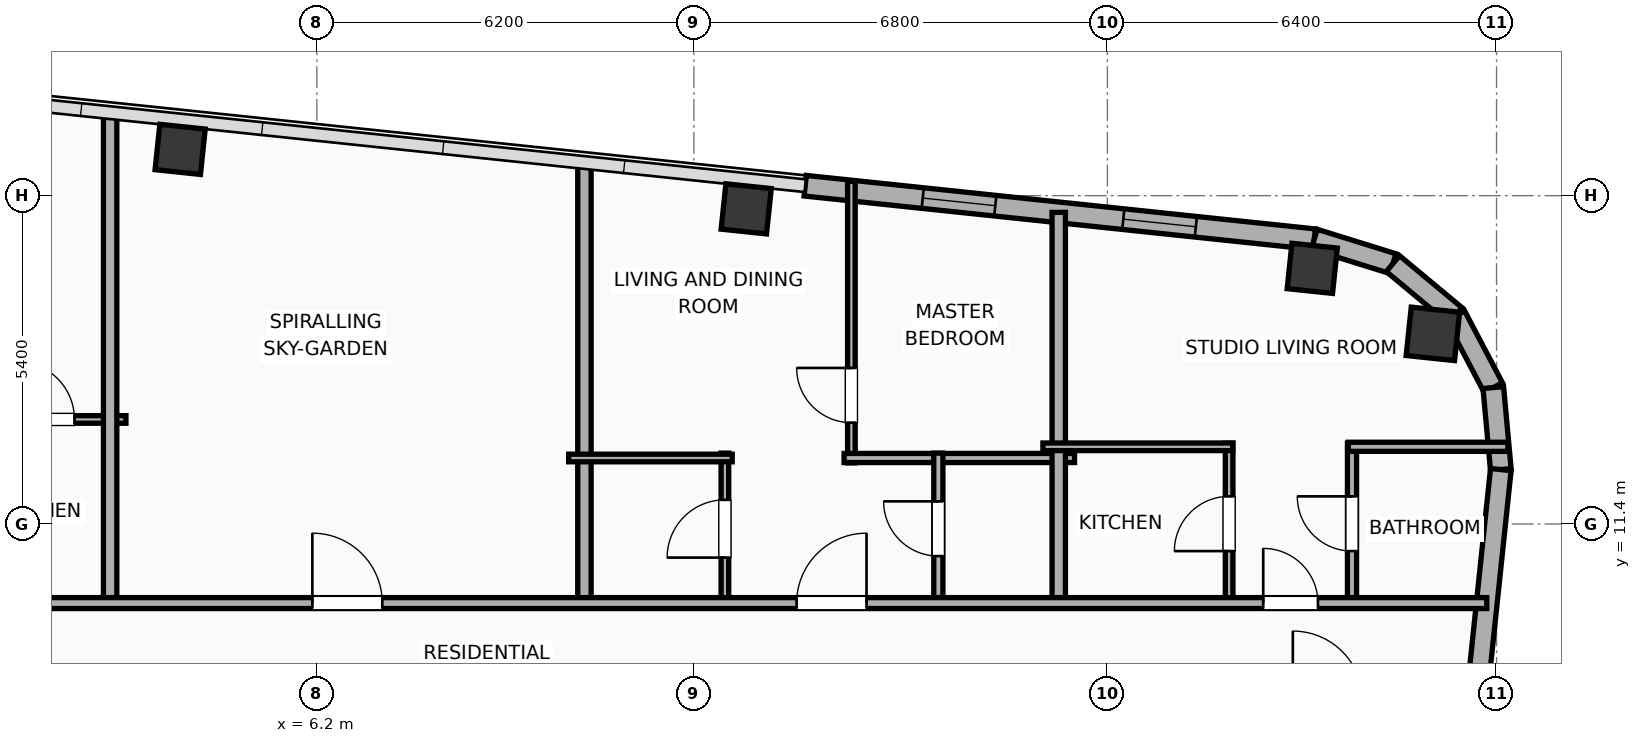
"""IFC4 building model, lengths in metres.
Left out: names, types, materials, properties, quantities, classifications, styles, units other than length and angle.
Written with IfcOpenShell. Run it as: python <this file> out.ifc"""

import sys

from ifc_helpers import new_model, si_unit, direction, frame, frame_2d, origin, origin_2d, place, context, subcontext, project, spatial, rectangle, hollow_rectangle, hollow_circle, extrude, element, fill, save


model = new_model("IFC4")
c1 = context("Model", 3, precision=1e-05, world=origin(), true_north=direction((0.0, 1.0)))
c2 = subcontext(c1, "Body", "Model", "MODEL_VIEW")
j1 = project(units=[si_unit("LENGTHUNIT", "METRE"), si_unit("PLANEANGLEUNIT", "RADIAN")], contexts=[c1])
p1 = place(None, origin())
s1 = spatial("IfcSite", under=j1, at=p1, CompositionType="ELEMENT")
p2 = place(p1, origin())
s2 = spatial("IfcBuilding", under=s1, at=p2, CompositionType="ELEMENT")
p3 = place(p2, frame((0.0, 0.0, 260.0)))
s3 = spatial("IfcBuildingStorey", under=s2, at=p3, CompositionType="ELEMENT", Elevation=260.0)
p4 = place(p3, frame((24.553, 14.527, 0.0), z_axis=(0.0, 0.0, 1.0), x_axis=(0.994521895368, -0.104528463268, 0.0)))
e1 = element("IfcColumn", 1, at=p4, inside=s3, PredefinedType="COLUMN", context=c2, shape_type="SweptSolid", body=[
    extrude(hollow_circle(Radius=0.4, WallThickness=0.028, at=origin_2d()), origin(), (0.0, 0.0, 1.0), 3.9),
])
for number, where, z_axis, x_axis in (
    (2, (22.569, 15.604, 0.0), (0.0, 0.0, 1.0), (0.995, -0.105, 0.0)),
    (3, (13.26, 16.583, 0.0), (0.0, 0.0, 1.0), (0.995, -0.105, 0.0)),
    (4, (3.952, 17.561, 0.0), (0.0, 0.0, 1.0), (0.995, -0.105, 0.0)),
):
    element("IfcColumn", number, at=place(p3, frame(where, z_axis=z_axis, x_axis=x_axis)), inside=s3, PredefinedType="COLUMN", context=c2, shape_type="SweptSolid", body=[
        extrude(hollow_rectangle(XDim=0.75, YDim=0.75, WallThickness=0.025, at=origin_2d()), origin(), (0.0, 0.0, 1.0), 3.9),
    ])
p5 = place(p3, frame((14.231, 16.964, 0.0), z_axis=(0.0, 0.0, 1.0), x_axis=(0.994522285292, -0.104524753323, 0.0)))
e5 = element("IfcWall", 5, at=p5, inside=s3, PredefinedType="ELEMENTEDWALL", context=c2, shape_type="SweptSolid", body=[
    extrude(rectangle(XDim=8.418, YDim=0.34, at=frame_2d((4.209, 0.0))), origin(), (0.0, 0.0, 1.0), 2.54),
])
p6 = place(p5, frame((1.944, 0.0, 0.75)))
e6 = element("IfcOpeningElement", 6, at=p6, cuts=e5, PredefinedType="OPENING", context=c2, shape_type="SweptSolid", body=[
    extrude(rectangle(XDim=1.2, YDim=1.63, at=frame_2d((0.6, 0.815))), frame((0.0, 0.18, 0.0), z_axis=(0.0, -1.0, 0.0), x_axis=(1.0, 0.0, 0.0)), (0.0, 0.0, 1.0), 0.36),
])
p7 = place(p5, frame((5.26, 0.0, 0.75)))
e7 = element("IfcOpeningElement", 7, at=p7, cuts=e5, PredefinedType="OPENING", context=c2, shape_type="SweptSolid", body=[
    extrude(rectangle(XDim=1.2, YDim=1.63, at=frame_2d((0.6, 0.815))), frame((0.0, 0.18, 0.0), z_axis=(0.0, -1.0, 0.0), x_axis=(1.0, 0.0, 0.0)), (0.0, 0.0, 1.0), 0.36),
])
p8 = place(p3, frame((22.603, 16.084, 0.0), z_axis=(0.0, 0.0, 1.0), x_axis=(0.955007802701, -0.296580674994, 0.0)))
e8 = element("IfcWall", 8, at=p8, inside=s3, PredefinedType="ELEMENTEDWALL", context=c2, shape_type="SweptSolid", body=[
    extrude(rectangle(XDim=1.354, YDim=0.34, at=frame_2d((0.677, 0.0))), origin(), (0.0, 0.0, 1.0), 2.54),
])
p9 = place(p3, frame((23.896, 15.682, 0.0), z_axis=(0.0, 0.0, 1.0), x_axis=(0.768789762863, -0.639501603217, 0.0)))
e9 = element("IfcWall", 9, at=p9, inside=s3, PredefinedType="ELEMENTEDWALL", context=c2, shape_type="SweptSolid", body=[
    extrude(rectangle(XDim=1.337, YDim=0.34, at=frame_2d((0.668, 0.0))), origin(), (0.0, 0.0, 1.0), 2.54),
])
p10 = place(p3, frame((24.924, 14.827, 0.0), z_axis=(0.0, 0.0, 1.0), x_axis=(0.46567116636, -0.884957832228, 0.0)))
e10 = element("IfcWall", 10, at=p10, inside=s3, PredefinedType="ELEMENTEDWALL", context=c2, shape_type="SweptSolid", body=[
    extrude(rectangle(XDim=1.337, YDim=0.34, at=frame_2d((0.668, 0.0))), origin(), (0.0, 0.0, 1.0), 3.65),
])
p11 = place(p3, frame((25.546, 13.644, 0.0), z_axis=(0.0, 0.0, 1.0), x_axis=(0.091592370975, -0.995796584438, 0.0)))
e11 = element("IfcWall", 11, at=p11, inside=s3, PredefinedType="ELEMENTEDWALL", context=c2, shape_type="SweptSolid", body=[
    extrude(rectangle(XDim=1.354, YDim=0.34, at=frame_2d((0.677, 0.0))), origin(), (0.0, 0.0, 1.0), 3.65),
])
p12 = place(p3, frame((25.67, 12.296, 0.0), z_axis=(0.0, 0.0, 1.0), x_axis=(-0.104533282919, -0.994521388791, 0.0)))
e12 = element("IfcWall", 12, at=p12, inside=s3, PredefinedType="ELEMENTEDWALL", context=c2, shape_type="SweptSolid", body=[
    extrude(rectangle(XDim=30.366, YDim=0.34, at=frame_2d((15.183, 0.0))), origin(), (0.0, 0.0, 1.0), 2.54),
])
p13 = place(p12, frame((5.842, 0.0, 0.75)))
e13 = element("IfcOpeningElement", 13, at=p13, cuts=e12, PredefinedType="OPENING", context=c2, shape_type="SweptSolid", body=[
    extrude(rectangle(XDim=1.8, YDim=1.63, at=frame_2d((0.9, 0.815))), frame((0.0, 0.18, 0.0), z_axis=(0.0, -1.0, 0.0), x_axis=(1.0, 0.0, 0.0)), (0.0, 0.0, 1.0), 0.36),
])
p14 = place(p12, frame((23.525, 0.0, 0.75)))
e14 = element("IfcOpeningElement", 14, at=p14, cuts=e12, PredefinedType="OPENING", context=c2, shape_type="SweptSolid", body=[
    extrude(rectangle(XDim=1.8, YDim=1.63, at=frame_2d((0.9, 0.815))), frame((0.0, 0.18, 0.0), z_axis=(0.0, -1.0, 0.0), x_axis=(1.0, 0.0, 0.0)), (0.0, 0.0, 1.0), 0.36),
])
p15 = place(p12, frame((27.017, 0.0, 0.75)))
e15 = element("IfcOpeningElement", 15, at=p15, cuts=e12, PredefinedType="OPENING", context=c2, shape_type="SweptSolid", body=[
    extrude(rectangle(XDim=1.2, YDim=1.63, at=frame_2d((0.6, 0.815))), frame((0.0, 0.18, 0.0), z_axis=(0.0, -1.0, 0.0), x_axis=(1.0, 0.0, 0.0)), (0.0, 0.0, 1.0), 0.36),
])
p16 = place(p12, frame((17.829, 0.0, 0.75)))
e16 = element("IfcOpeningElement", 16, at=p16, cuts=e12, PredefinedType="OPENING", context=c2, shape_type="SweptSolid", body=[
    extrude(rectangle(XDim=1.2, YDim=1.63, at=frame_2d((0.6, 0.815))), frame((0.0, 0.18, 0.0), z_axis=(0.0, -1.0, 0.0), x_axis=(1.0, 0.0, 0.0)), (0.0, 0.0, 1.0), 0.36),
])
p17 = place(p3, frame((0.417, 13.12, 0.0), z_axis=(0.0, 0.0, 1.0), x_axis=(1.0, 0.0, 0.0)))
e17 = element("IfcWall", 17, at=p17, inside=s3, PredefinedType="PARTITIONING", context=c2, shape_type="SweptSolid", body=[
    extrude(rectangle(XDim=2.643, YDim=0.125, at=frame_2d((1.322, 0.0))), origin(), (0.0, 0.0, 1.0), 3.65),
])
p18 = place(p17, frame((0.846, 0.0, 0.0)))
e18 = element("IfcOpeningElement", 18, at=p18, cuts=e17, PredefinedType="OPENING", context=c2, shape_type="SweptSolid", body=[
    extrude(rectangle(XDim=0.95, YDim=2.05, at=frame_2d((0.475, 1.025))), frame((0.0, 0.073, 0.0), z_axis=(0.0, -1.0, 0.0), x_axis=(1.0, 0.0, 0.0)), (0.0, 0.0, 1.0), 0.145),
])
p19 = place(p3, frame((2.8, 10.02, 0.0), z_axis=(0.0, 0.0, 1.0), x_axis=(0.0, 1.0, 0.0)))
e19 = element("IfcWall", 19, at=p19, inside=s3, PredefinedType="PARTITIONING", context=c2, shape_type="SweptSolid", body=[
    extrude(rectangle(XDim=8.145, YDim=0.22, at=frame_2d((4.073, 0.0))), origin(), (0.0, 0.0, 1.0), 3.65),
])
p20 = place(p3, frame((10.6, 10.02, 0.0), z_axis=(0.0, 0.0, 1.0), x_axis=(0.0, 1.0, 0.0)))
e20 = element("IfcWall", 20, at=p20, inside=s3, PredefinedType="PARTITIONING", context=c2, shape_type="SweptSolid", body=[
    extrude(rectangle(XDim=7.325, YDim=0.22, at=frame_2d((3.663, 0.0))), origin(), (0.0, 0.0, 1.0), 3.65),
])
p21 = place(p3, frame((14.99, 12.406, 0.0), z_axis=(0.0, 0.0, 1.0), x_axis=(0.0, 1.0, 0.0)))
e21 = element("IfcWall", 21, at=p21, inside=s3, PredefinedType="PARTITIONING", context=c2, shape_type="SweptSolid", body=[
    extrude(rectangle(XDim=4.629, YDim=0.125, at=frame_2d((2.314, 0.0))), origin(), (0.0, 0.0, 1.0), 3.65),
])
p22 = place(p21, frame((0.661, 0.0, 0.0)))
e22 = element("IfcOpeningElement", 22, at=p22, cuts=e21, PredefinedType="OPENING", context=c2, shape_type="SweptSolid", body=[
    extrude(rectangle(XDim=0.9, YDim=2.05, at=frame_2d((0.45, 1.025))), frame((0.0, 0.073, 0.0), z_axis=(0.0, -1.0, 0.0), x_axis=(1.0, 0.0, 0.0)), (0.0, 0.0, 1.0), 0.145),
])
p23 = place(p3, frame((14.87, 12.486, 0.0), z_axis=(0.0, 0.0, 1.0), x_axis=(1.0, 0.0, 0.0)))
e23 = element("IfcWall", 23, at=p23, inside=s3, PredefinedType="PLUMBINGWALL", context=c2, shape_type="SweptSolid", body=[
    extrude(rectangle(XDim=3.79, YDim=0.15, at=frame_2d((1.895, 0.0))), origin(), (0.0, 0.0, 1.0), 3.65),
])
p24 = place(p3, frame((12.91, 10.08, 0.0), z_axis=(0.0, 0.0, 1.0), x_axis=(0.0, 1.0, 0.0)))
e24 = element("IfcWall", 24, at=p24, inside=s3, PredefinedType="PARTITIONING", context=c2, shape_type="SweptSolid", body=[
    extrude(rectangle(XDim=2.486, YDim=0.125, at=frame_2d((1.243, 0.0))), origin(), (0.0, 0.0, 1.0), 2.54),
])
p25 = place(p24, frame((0.768, 0.0, 0.0)))
e25 = element("IfcOpeningElement", 25, at=p25, cuts=e24, PredefinedType="OPENING", context=c2, shape_type="SweptSolid", body=[
    extrude(rectangle(XDim=0.95, YDim=2.05, at=frame_2d((0.475, 1.025))), frame((0.0, 0.073, 0.0), z_axis=(0.0, -1.0, 0.0), x_axis=(1.0, 0.0, 0.0)), (0.0, 0.0, 1.0), 0.145),
])
p26 = place(p3, frame((10.34, 12.486, 0.0), z_axis=(0.0, 0.0, 1.0), x_axis=(1.0, 0.0, 0.0)))
e26 = element("IfcWall", 26, at=p26, inside=s3, PredefinedType="PARTITIONING", context=c2, shape_type="SweptSolid", body=[
    extrude(rectangle(XDim=2.69, YDim=0.125, at=frame_2d((1.345, 0.0))), origin(), (0.0, 0.0, 1.0), 3.65),
])
p27 = place(p3, frame((16.42, 10.08, 0.0), z_axis=(0.0, 0.0, 1.0), x_axis=(0.0, 1.0, 0.0)))
e27 = element("IfcWall", 27, at=p27, inside=s3, PredefinedType="PLUMBINGWALL", context=c2, shape_type="SweptSolid", body=[
    extrude(rectangle(XDim=2.486, YDim=0.15, at=frame_2d((1.243, 0.0))), origin(), (0.0, 0.0, 1.0), 3.65),
])
p28 = place(p27, frame((0.793, 0.0, 0.0)))
e28 = element("IfcOpeningElement", 28, at=p28, cuts=e27, PredefinedType="OPENING", context=c2, shape_type="SweptSolid", body=[
    extrude(rectangle(XDim=0.9, YDim=2.05, at=frame_2d((0.45, 1.025))), frame((0.0, 0.085, 0.0), z_axis=(0.0, -1.0, 0.0), x_axis=(1.0, 0.0, 0.0)), (0.0, 0.0, 1.0), 0.17),
])
p29 = place(p3, frame((18.4, 10.02, 0.0), z_axis=(0.0, 0.0, 1.0), x_axis=(0.0, 1.0, 0.0)))
e29 = element("IfcWall", 29, at=p29, inside=s3, PredefinedType="PARTITIONING", context=c2, shape_type="SweptSolid", body=[
    extrude(rectangle(XDim=6.505, YDim=0.22, at=frame_2d((3.253, 0.0))), origin(), (0.0, 0.0, 1.0), 3.65),
])
p30 = place(p3, frame((21.202, 10.08, 0.0), z_axis=(0.0, 0.0, 1.0), x_axis=(0.0, 1.0, 0.0)))
e30 = element("IfcWall", 30, at=p30, inside=s3, PredefinedType="PARTITIONING", context=c2, shape_type="SweptSolid", body=[
    extrude(rectangle(XDim=2.65, YDim=0.125, at=frame_2d((1.325, 0.0))), origin(), (0.0, 0.0, 1.0), 2.54),
])
p31 = place(p30, frame((0.875, 0.0, 0.0)))
e31 = element("IfcOpeningElement", 31, at=p31, cuts=e30, PredefinedType="OPENING", context=c2, shape_type="SweptSolid", body=[
    extrude(rectangle(XDim=0.9, YDim=2.05, at=frame_2d((0.45, 1.025))), frame((0.0, 0.073, 0.0), z_axis=(0.0, -1.0, 0.0), x_axis=(1.0, 0.0, 0.0)), (0.0, 0.0, 1.0), 0.145),
])
p32 = place(p3, frame((23.223, 10.08, 0.0), z_axis=(0.0, 0.0, 1.0), x_axis=(0.0, 1.0, 0.0)))
e32 = element("IfcWall", 32, at=p32, inside=s3, PredefinedType="PLUMBINGWALL", context=c2, shape_type="SweptSolid", body=[
    extrude(rectangle(XDim=2.65, YDim=0.15, at=frame_2d((1.325, 0.0))), origin(), (0.0, 0.0, 1.0), 3.65),
])
p33 = place(p32, frame((0.875, 0.0, 0.0)))
e33 = element("IfcOpeningElement", 33, at=p33, cuts=e32, PredefinedType="OPENING", context=c2, shape_type="SweptSolid", body=[
    extrude(rectangle(XDim=0.9, YDim=2.05, at=frame_2d((0.45, 1.025))), frame((0.0, 0.085, 0.0), z_axis=(0.0, -1.0, 0.0), x_axis=(1.0, 0.0, 0.0)), (0.0, 0.0, 1.0), 0.17),
])
p34 = place(p3, frame((18.14, 12.67, 0.0), z_axis=(0.0, 0.0, 1.0), x_axis=(1.0, 0.0, 0.0)))
e34 = element("IfcWall", 34, at=p34, inside=s3, PredefinedType="PARTITIONING", context=c2, shape_type="SweptSolid", body=[
    extrude(rectangle(XDim=3.122, YDim=0.125, at=frame_2d((1.561, 0.0))), origin(), (0.0, 0.0, 1.0), 3.65),
])
p35 = place(p3, frame((23.163, 12.67, 0.0), z_axis=(0.0, 0.0, 1.0), x_axis=(1.0, 0.0, 0.0)))
e35 = element("IfcWall", 35, at=p35, inside=s3, PredefinedType="PLUMBINGWALL", context=c2, shape_type="SweptSolid", body=[
    extrude(rectangle(XDim=2.623, YDim=0.15, at=frame_2d((1.312, 0.0))), origin(), (0.0, 0.0, 1.0), 3.65),
])
p36 = place(p3, frame((-28.516, 10.1, 0.0), z_axis=(0.0, 0.0, 1.0), x_axis=(1.0, 0.0, 0.0)))
e36 = element("IfcWall", 36, at=p36, inside=s3, PredefinedType="PARTITIONING", context=c2, shape_type="SweptSolid", body=[
    extrude(rectangle(XDim=53.955, YDim=0.18, at=frame_2d((26.978, 0.0))), origin(), (0.0, 0.0, 1.0), 3.65),
])
p37 = place(p36, frame((3.515, 0.0, 0.0)))
e37 = element("IfcOpeningElement", 37, at=p37, cuts=e36, PredefinedType="OPENING", context=c2, shape_type="SweptSolid", body=[
    extrude(rectangle(XDim=1.15, YDim=2.05, at=frame_2d((0.575, 1.025))), frame((0.0, 0.1, 0.0), z_axis=(0.0, -1.0, 0.0), x_axis=(1.0, 0.0, 0.0)), (0.0, 0.0, 1.0), 0.2),
])
p38 = place(p36, frame((11.408, 0.0, 0.0)))
e38 = element("IfcOpeningElement", 38, at=p38, cuts=e36, PredefinedType="OPENING", context=c2, shape_type="SweptSolid", body=[
    extrude(rectangle(XDim=1.15, YDim=2.05, at=frame_2d((0.575, 1.025))), frame((0.0, 0.1, 0.0), z_axis=(0.0, -1.0, 0.0), x_axis=(1.0, 0.0, 0.0)), (0.0, 0.0, 1.0), 0.2),
])
p39 = place(p36, frame((19.205, 0.0, 0.0)))
e39 = element("IfcOpeningElement", 39, at=p39, cuts=e36, PredefinedType="OPENING", context=c2, shape_type="SweptSolid", body=[
    extrude(rectangle(XDim=1.15, YDim=2.05, at=frame_2d((0.575, 1.025))), frame((0.0, 0.1, 0.0), z_axis=(0.0, -1.0, 0.0), x_axis=(1.0, 0.0, 0.0)), (0.0, 0.0, 1.0), 0.2),
])
p40 = place(p36, frame((27.159, 0.0, 0.0)))
e40 = element("IfcOpeningElement", 40, at=p40, cuts=e36, PredefinedType="OPENING", context=c2, shape_type="SweptSolid", body=[
    extrude(rectangle(XDim=0.9, YDim=2.05, at=frame_2d((0.45, 1.025))), frame((0.0, 0.1, 0.0), z_axis=(0.0, -1.0, 0.0), x_axis=(1.0, 0.0, 0.0)), (0.0, 0.0, 1.0), 0.2),
])
p41 = place(p36, frame((34.642, 0.0, 0.0)))
e41 = element("IfcOpeningElement", 41, at=p41, cuts=e36, PredefinedType="OPENING", context=c2, shape_type="SweptSolid", body=[
    extrude(rectangle(XDim=1.15, YDim=2.05, at=frame_2d((0.575, 1.025))), frame((0.0, 0.1, 0.0), z_axis=(0.0, -1.0, 0.0), x_axis=(1.0, 0.0, 0.0)), (0.0, 0.0, 1.0), 0.2),
])
p42 = place(p36, frame((42.606, 0.0, 0.0)))
e42 = element("IfcOpeningElement", 42, at=p42, cuts=e36, PredefinedType="OPENING", context=c2, shape_type="SweptSolid", body=[
    extrude(rectangle(XDim=1.15, YDim=2.05, at=frame_2d((0.575, 1.025))), frame((0.0, 0.1, 0.0), z_axis=(0.0, -1.0, 0.0), x_axis=(1.0, 0.0, 0.0)), (0.0, 0.0, 1.0), 0.2),
])
p43 = place(p36, frame((50.279, 0.0, 0.0)))
e43 = element("IfcOpeningElement", 43, at=p43, cuts=e36, PredefinedType="OPENING", context=c2, shape_type="SweptSolid", body=[
    extrude(rectangle(XDim=0.9, YDim=2.05, at=frame_2d((0.45, 1.025))), frame((0.0, 0.1, 0.0), z_axis=(0.0, -1.0, 0.0), x_axis=(1.0, 0.0, 0.0)), (0.0, 0.0, 1.0), 0.2),
])
p44 = place(p6, origin())
e44 = element("IfcWindow", 44, at=p44, inside=s3, PartitioningType="SINGLE_PANEL", PredefinedType="WINDOW", context=c2, shape_type="SweptSolid", body=[
    extrude(rectangle(XDim=1.2, YDim=1.63, at=frame_2d((0.6, 0.815))), frame((0.0, 0.03, 0.0), z_axis=(0.0, -1.0, 0.0), x_axis=(1.0, 0.0, 0.0)), (0.0, 0.0, 1.0), 0.06),
])
fill(e6, e44)
p45 = place(p7, origin())
e45 = element("IfcWindow", 45, at=p45, inside=s3, PartitioningType="SINGLE_PANEL", PredefinedType="WINDOW", context=c2, shape_type="SweptSolid", body=[
    extrude(rectangle(XDim=1.2, YDim=1.63, at=frame_2d((0.6, 0.815))), frame((0.0, 0.03, 0.0), z_axis=(0.0, -1.0, 0.0), x_axis=(1.0, 0.0, 0.0)), (0.0, 0.0, 1.0), 0.06),
])
fill(e7, e45)
p46 = place(p18, origin())
e46 = element("IfcDoor", 46, at=p46, inside=s3, OperationType="SINGLE_SWING_LEFT", PredefinedType="DOOR", context=c2, shape_type="SweptSolid", body=[
    extrude(rectangle(XDim=0.95, YDim=2.05, at=frame_2d((0.475, 1.025))), frame((0.0, 0.025, 0.0), z_axis=(0.0, -1.0, 0.0), x_axis=(1.0, 0.0, 0.0)), (0.0, 0.0, 1.0), 0.05),
])
fill(e18, e46)
p47 = place(p22, origin())
e47 = element("IfcDoor", 47, at=p47, inside=s3, OperationType="SINGLE_SWING_RIGHT", PredefinedType="DOOR", context=c2, shape_type="SweptSolid", body=[
    extrude(rectangle(XDim=0.9, YDim=2.05, at=frame_2d((0.45, 1.025))), frame((0.0, 0.025, 0.0), z_axis=(0.0, -1.0, 0.0), x_axis=(1.0, 0.0, 0.0)), (0.0, 0.0, 1.0), 0.05),
])
fill(e22, e47)
p48 = place(p25, origin())
e48 = element("IfcDoor", 48, at=p48, inside=s3, OperationType="SINGLE_SWING_LEFT", PredefinedType="DOOR", context=c2, shape_type="SweptSolid", body=[
    extrude(rectangle(XDim=0.95, YDim=2.05, at=frame_2d((0.475, 1.025))), frame((0.0, 0.025, 0.0), z_axis=(0.0, -1.0, 0.0), x_axis=(1.0, 0.0, 0.0)), (0.0, 0.0, 1.0), 0.05),
])
fill(e25, e48)
p49 = place(p28, origin())
e49 = element("IfcDoor", 49, at=p49, inside=s3, OperationType="SINGLE_SWING_RIGHT", PredefinedType="DOOR", context=c2, shape_type="SweptSolid", body=[
    extrude(rectangle(XDim=0.9, YDim=2.05, at=frame_2d((0.45, 1.025))), frame((0.0, 0.025, 0.0), z_axis=(0.0, -1.0, 0.0), x_axis=(1.0, 0.0, 0.0)), (0.0, 0.0, 1.0), 0.05),
])
fill(e28, e49)
p50 = place(p31, origin())
e50 = element("IfcDoor", 50, at=p50, inside=s3, OperationType="SINGLE_SWING_LEFT", PredefinedType="DOOR", context=c2, shape_type="SweptSolid", body=[
    extrude(rectangle(XDim=0.9, YDim=2.05, at=frame_2d((0.45, 1.025))), frame((0.0, 0.025, 0.0), z_axis=(0.0, -1.0, 0.0), x_axis=(1.0, 0.0, 0.0)), (0.0, 0.0, 1.0), 0.05),
])
fill(e31, e50)
p51 = place(p33, origin())
e51 = element("IfcDoor", 51, at=p51, inside=s3, OperationType="SINGLE_SWING_RIGHT", PredefinedType="DOOR", context=c2, shape_type="SweptSolid", body=[
    extrude(rectangle(XDim=0.9, YDim=2.05, at=frame_2d((0.45, 1.025))), frame((0.0, 0.025, 0.0), z_axis=(0.0, -1.0, 0.0), x_axis=(1.0, 0.0, 0.0)), (0.0, 0.0, 1.0), 0.05),
])
fill(e33, e51)
p52 = place(p41, origin())
e52 = element("IfcDoor", 52, at=p52, inside=s3, OperationType="SINGLE_SWING_LEFT", PredefinedType="DOOR", context=c2, shape_type="SweptSolid", body=[
    extrude(rectangle(XDim=1.15, YDim=2.05, at=frame_2d((0.575, 1.025))), frame((0.0, 0.025, 0.0), z_axis=(0.0, -1.0, 0.0), x_axis=(1.0, 0.0, 0.0)), (0.0, 0.0, 1.0), 0.05),
])
fill(e41, e52)
p53 = place(p42, origin())
e53 = element("IfcDoor", 53, at=p53, inside=s3, OperationType="SINGLE_SWING_RIGHT", PredefinedType="DOOR", context=c2, shape_type="SweptSolid", body=[
    extrude(rectangle(XDim=1.15, YDim=2.05, at=frame_2d((0.575, 1.025))), frame((0.0, 0.025, 0.0), z_axis=(0.0, -1.0, 0.0), x_axis=(1.0, 0.0, 0.0)), (0.0, 0.0, 1.0), 0.05),
])
fill(e42, e53)
p54 = place(p43, origin())
e54 = element("IfcDoor", 54, at=p54, inside=s3, OperationType="SINGLE_SWING_LEFT", PredefinedType="DOOR", context=c2, shape_type="SweptSolid", body=[
    extrude(rectangle(XDim=0.9, YDim=2.05, at=frame_2d((0.45, 1.025))), frame((0.0, 0.025, 0.0), z_axis=(0.0, -1.0, 0.0), x_axis=(1.0, 0.0, 0.0)), (0.0, 0.0, 1.0), 0.05),
])
fill(e43, e54)
save(model, sys.argv[1])
